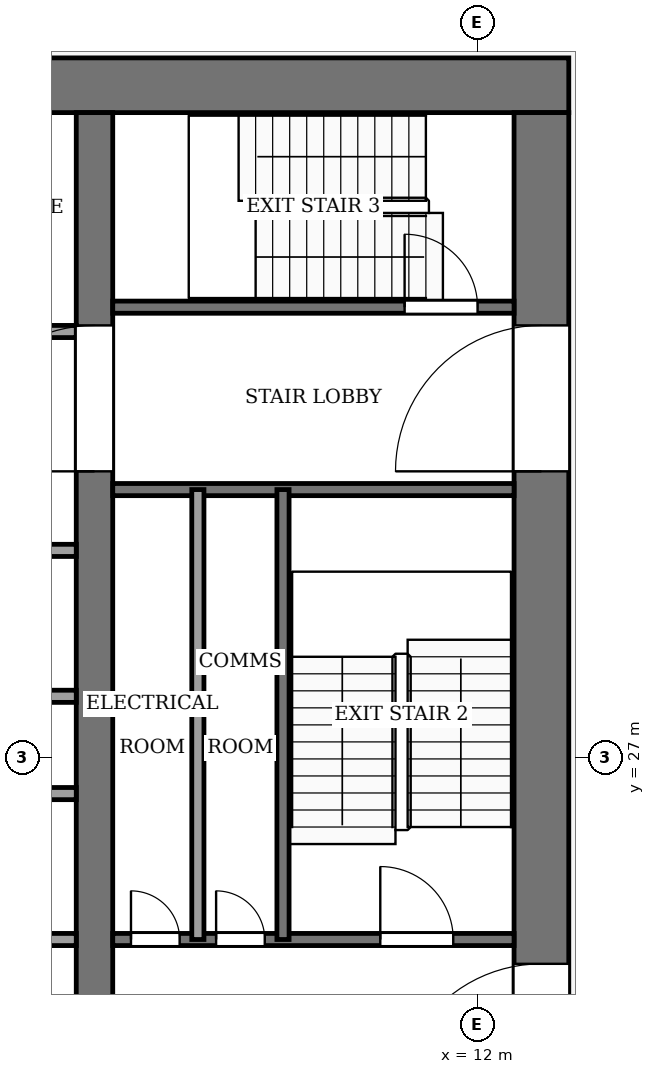
"""IFC4 building model, lengths in metres.
Left out: names, types, materials, properties, quantities, classifications, styles, units other than length and angle.
Written with IfcOpenShell. Run it as: python <this file> out.ifc"""

import sys

from ifc_helpers import new_model, si_unit, direction, frame, frame_2d, origin, place, context, subcontext, project, spatial, rectangle, extrude, element, fill, save


model = new_model("IFC4")
c1 = context("Model", 3, precision=1e-05, world=origin(), true_north=direction((0.0, 1.0)))
c2 = subcontext(c1, "Body", "Model", "MODEL_VIEW")
j1 = project(units=[si_unit("LENGTHUNIT", "METRE"), si_unit("PLANEANGLEUNIT", "RADIAN")], contexts=[c1])
p1 = place(None, origin())
s1 = spatial("IfcSite", under=j1, at=p1, CompositionType="ELEMENT")
p2 = place(p1, origin())
s2 = spatial("IfcBuilding", under=s1, at=p2, CompositionType="ELEMENT")
p3 = place(p2, frame((0.0, 0.0, 198.0)))
s3 = spatial("IfcBuildingStorey", under=s2, at=p3, CompositionType="ELEMENT", Elevation=198.0)
p4 = place(p3, frame((-13.5, 38.05, -0.13), z_axis=(0.0, 0.0, 1.0), x_axis=(1.0, 0.0, 0.0)))
e1 = element("IfcWall", 1, at=p4, inside=s3, PredefinedType="SHEAR", context=c2, shape_type="SweptSolid", body=[
    extrude(rectangle(XDim=27.0, YDim=0.9, at=frame_2d((13.5, 0.0))), origin(), (0.0, 0.0, 1.0), 4.0),
])
p5 = place(p3, frame((13.05, 18.4, -0.13), z_axis=(0.0, 0.0, 1.0), x_axis=(0.0, 1.0, 0.0)))
e2 = element("IfcWall", 2, at=p5, inside=s3, PredefinedType="SHEAR", context=c2, shape_type="SweptSolid", body=[
    extrude(rectangle(XDim=19.2, YDim=0.9, at=frame_2d((9.6, 0.0))), origin(), (0.0, 0.0, 1.0), 4.0),
])
p6 = place(p5, frame((2.8, 0.0, 0.13)))
e3 = element("IfcOpeningElement", 3, at=p6, cuts=e2, PredefinedType="OPENING", context=c2, shape_type="SweptSolid", body=[
    extrude(rectangle(XDim=2.4, YDim=2.4, at=frame_2d((1.2, 1.2))), frame((0.0, 0.46, 0.0), z_axis=(0.0, -1.0, 0.0), x_axis=(1.0, 0.0, 0.0)), (0.0, 0.0, 1.0), 0.92),
])
p7 = place(p5, frame((13.3, 0.0, 0.13)))
e4 = element("IfcOpeningElement", 4, at=p7, cuts=e2, PredefinedType="OPENING", context=c2, shape_type="SweptSolid", body=[
    extrude(rectangle(XDim=2.4, YDim=2.4, at=frame_2d((1.2, 1.2))), frame((0.0, 0.46, 0.0), z_axis=(0.0, -1.0, 0.0), x_axis=(1.0, 0.0, 0.0)), (0.0, 0.0, 1.0), 0.92),
])
p8 = place(p3, frame((5.7, 18.4, -0.13), z_axis=(0.0, 0.0, 1.0), x_axis=(0.0, 1.0, 0.0)))
e5 = element("IfcWall", 5, at=p8, inside=s3, PredefinedType="SHEAR", context=c2, shape_type="SweptSolid", body=[
    extrude(rectangle(XDim=19.2, YDim=0.6, at=frame_2d((9.6, 0.0))), origin(), (0.0, 0.0, 1.0), 4.0),
])
p9 = place(p8, frame((13.3, 0.0, 0.13)))
e6 = element("IfcOpeningElement", 6, at=p9, cuts=e5, PredefinedType="OPENING", context=c2, shape_type="SweptSolid", body=[
    extrude(rectangle(XDim=2.4, YDim=2.4, at=frame_2d((1.2, 1.2))), frame((0.0, 0.31, 0.0), z_axis=(0.0, -1.0, 0.0), x_axis=(1.0, 0.0, 0.0)), (0.0, 0.0, 1.0), 0.62),
])
p10 = place(p3, frame((-5.4, 24.0, 0.0), z_axis=(0.0, 0.0, 1.0), x_axis=(1.0, 0.0, 0.0)))
e7 = element("IfcWall", 7, at=p10, inside=s3, PredefinedType="PARTITIONING", context=c2, shape_type="SweptSolid", body=[
    extrude(rectangle(XDim=10.8, YDim=0.2, at=frame_2d((5.4, 0.0))), origin(), (0.0, 0.0, 1.0), 3.87),
])
p11 = place(p10, frame((0.75, 0.0, 0.0)))
e8 = element("IfcOpeningElement", 8, at=p11, cuts=e7, PredefinedType="OPENING", context=c2, shape_type="SweptSolid", body=[
    extrude(rectangle(XDim=1.2, YDim=2.2, at=frame_2d((0.6, 1.1))), frame((0.0, 0.11, 0.0), z_axis=(0.0, -1.0, 0.0), x_axis=(1.0, 0.0, 0.0)), (0.0, 0.0, 1.0), 0.22),
])
p12 = place(p10, frame((3.45, 0.0, 0.0)))
e9 = element("IfcOpeningElement", 9, at=p12, cuts=e7, PredefinedType="OPENING", context=c2, shape_type="SweptSolid", body=[
    extrude(rectangle(XDim=1.2, YDim=2.2, at=frame_2d((0.6, 1.1))), frame((0.0, 0.11, 0.0), z_axis=(0.0, -1.0, 0.0), x_axis=(1.0, 0.0, 0.0)), (0.0, 0.0, 1.0), 0.22),
])
p13 = place(p10, frame((6.15, 0.0, 0.0)))
e10 = element("IfcOpeningElement", 10, at=p13, cuts=e7, PredefinedType="OPENING", context=c2, shape_type="SweptSolid", body=[
    extrude(rectangle(XDim=1.2, YDim=2.2, at=frame_2d((0.6, 1.1))), frame((0.0, 0.11, 0.0), z_axis=(0.0, -1.0, 0.0), x_axis=(1.0, 0.0, 0.0)), (0.0, 0.0, 1.0), 0.22),
])
p14 = place(p10, frame((8.85, 0.0, 0.0)))
e11 = element("IfcOpeningElement", 11, at=p14, cuts=e7, PredefinedType="OPENING", context=c2, shape_type="SweptSolid", body=[
    extrude(rectangle(XDim=1.2, YDim=2.2, at=frame_2d((0.6, 1.1))), frame((0.0, 0.11, 0.0), z_axis=(0.0, -1.0, 0.0), x_axis=(1.0, 0.0, 0.0)), (0.0, 0.0, 1.0), 0.22),
])
p15 = place(p3, frame((6.0, 24.0, 0.0), z_axis=(0.0, 0.0, 1.0), x_axis=(1.0, 0.0, 0.0)))
e12 = element("IfcWall", 12, at=p15, inside=s3, PredefinedType="PARTITIONING", context=c2, shape_type="SweptSolid", body=[
    extrude(rectangle(XDim=6.6, YDim=0.2, at=frame_2d((3.3, 0.0))), origin(), (0.0, 0.0, 1.0), 3.87),
])
p16 = place(p15, frame((0.3, 0.0, 0.0)))
e13 = element("IfcOpeningElement", 13, at=p16, cuts=e12, PredefinedType="OPENING", context=c2, shape_type="SweptSolid", body=[
    extrude(rectangle(XDim=0.8, YDim=2.1, at=frame_2d((0.4, 1.05))), frame((0.0, 0.11, 0.0), z_axis=(0.0, -1.0, 0.0), x_axis=(1.0, 0.0, 0.0)), (0.0, 0.0, 1.0), 0.22),
])
p17 = place(p15, frame((1.7, 0.0, 0.0)))
e14 = element("IfcOpeningElement", 14, at=p17, cuts=e12, PredefinedType="OPENING", context=c2, shape_type="SweptSolid", body=[
    extrude(rectangle(XDim=0.8, YDim=2.1, at=frame_2d((0.4, 1.05))), frame((0.0, 0.11, 0.0), z_axis=(0.0, -1.0, 0.0), x_axis=(1.0, 0.0, 0.0)), (0.0, 0.0, 1.0), 0.22),
])
p18 = place(p15, frame((4.4, 0.0, 0.0)))
e15 = element("IfcOpeningElement", 15, at=p18, cuts=e12, PredefinedType="OPENING", context=c2, shape_type="SweptSolid", body=[
    extrude(rectangle(XDim=1.2, YDim=2.2, at=frame_2d((0.6, 1.1))), frame((0.0, 0.11, 0.0), z_axis=(0.0, -1.0, 0.0), x_axis=(1.0, 0.0, 0.0)), (0.0, 0.0, 1.0), 0.22),
])
for number, where, z_axis, x_axis in (
    (16, (-5.4, 26.4, 0.0), (0.0, 0.0, 1.0), (1.0, 0.0, 0.0)),
    (17, (-5.4, 28.0, 0.0), (0.0, 0.0, 1.0), (1.0, 0.0, 0.0)),
):
    element("IfcWall", number, at=place(p3, frame(where, z_axis=z_axis, x_axis=x_axis)), inside=s3, PredefinedType="PARTITIONING", context=c2, shape_type="SweptSolid", body=[
        extrude(rectangle(XDim=10.8, YDim=0.2, at=frame_2d((5.4, 0.0))), origin(), (0.0, 0.0, 1.0), 3.87),
    ])
p19 = place(p3, frame((-5.4, 30.4, 0.0), z_axis=(0.0, 0.0, 1.0), x_axis=(1.0, 0.0, 0.0)))
e18 = element("IfcWall", 18, at=p19, inside=s3, PredefinedType="PARTITIONING", context=c2, shape_type="SweptSolid", body=[
    extrude(rectangle(XDim=10.8, YDim=0.2, at=frame_2d((5.4, 0.0))), origin(), (0.0, 0.0, 1.0), 3.87),
])
p20 = place(p19, frame((2.632, 0.0, 0.0)))
e19 = element("IfcOpeningElement", 19, at=p20, cuts=e18, PredefinedType="OPENING", context=c2, shape_type="SweptSolid", body=[
    extrude(rectangle(XDim=1.0, YDim=2.1, at=frame_2d((0.5, 1.05))), frame((0.0, 0.11, 0.0), z_axis=(0.0, -1.0, 0.0), x_axis=(1.0, 0.0, 0.0)), (0.0, 0.0, 1.0), 0.22),
])
p21 = place(p19, frame((8.032, 0.0, 0.0)))
e20 = element("IfcOpeningElement", 20, at=p21, cuts=e18, PredefinedType="OPENING", context=c2, shape_type="SweptSolid", body=[
    extrude(rectangle(XDim=1.0, YDim=2.1, at=frame_2d((0.5, 1.05))), frame((0.0, 0.11, 0.0), z_axis=(0.0, -1.0, 0.0), x_axis=(1.0, 0.0, 0.0)), (0.0, 0.0, 1.0), 0.22),
])
p22 = place(p3, frame((6.0, 31.4, 0.0), z_axis=(0.0, 0.0, 1.0), x_axis=(1.0, 0.0, 0.0)))
e21 = element("IfcWall", 21, at=p22, inside=s3, PredefinedType="PARTITIONING", context=c2, shape_type="SweptSolid", body=[
    extrude(rectangle(XDim=6.6, YDim=0.2, at=frame_2d((3.3, 0.0))), origin(), (0.0, 0.0, 1.0), 3.87),
])
p23 = place(p3, frame((-5.4, 34.0, 0.0), z_axis=(0.0, 0.0, 1.0), x_axis=(1.0, 0.0, 0.0)))
e22 = element("IfcWall", 22, at=p23, inside=s3, PredefinedType="PARTITIONING", context=c2, shape_type="SweptSolid", body=[
    extrude(rectangle(XDim=10.8, YDim=0.2, at=frame_2d((5.4, 0.0))), origin(), (0.0, 0.0, 1.0), 3.87),
])
p24 = place(p23, frame((6.15, 0.0, 0.0)))
e23 = element("IfcOpeningElement", 23, at=p24, cuts=e22, PredefinedType="OPENING", context=c2, shape_type="SweptSolid", body=[
    extrude(rectangle(XDim=1.2, YDim=2.2, at=frame_2d((0.6, 1.1))), frame((0.0, 0.11, 0.0), z_axis=(0.0, -1.0, 0.0), x_axis=(1.0, 0.0, 0.0)), (0.0, 0.0, 1.0), 0.22),
])
p25 = place(p23, frame((8.95, 0.0, 0.0)))
e24 = element("IfcOpeningElement", 24, at=p25, cuts=e22, PredefinedType="OPENING", context=c2, shape_type="SweptSolid", body=[
    extrude(rectangle(XDim=1.0, YDim=2.1, at=frame_2d((0.5, 1.05))), frame((0.0, 0.11, 0.0), z_axis=(0.0, -1.0, 0.0), x_axis=(1.0, 0.0, 0.0)), (0.0, 0.0, 1.0), 0.22),
])
p26 = place(p3, frame((6.0, 34.4, 0.0), z_axis=(0.0, 0.0, 1.0), x_axis=(1.0, 0.0, 0.0)))
e25 = element("IfcWall", 25, at=p26, inside=s3, PredefinedType="PARTITIONING", context=c2, shape_type="SweptSolid", body=[
    extrude(rectangle(XDim=6.6, YDim=0.2, at=frame_2d((3.3, 0.0))), origin(), (0.0, 0.0, 1.0), 3.87),
])
p27 = place(p26, frame((4.8, 0.0, 0.0)))
e26 = element("IfcOpeningElement", 26, at=p27, cuts=e25, PredefinedType="OPENING", context=c2, shape_type="SweptSolid", body=[
    extrude(rectangle(XDim=1.2, YDim=2.2, at=frame_2d((0.6, 1.1))), frame((0.0, 0.11, 0.0), z_axis=(0.0, -1.0, 0.0), x_axis=(1.0, 0.0, 0.0)), (0.0, 0.0, 1.0), 0.22),
])
for number, where, z_axis, x_axis in (
    (27, (7.4, 24.0, 0.0), (0.0, 0.0, 1.0), (0.0, 1.0, 0.0)),
    (28, (8.8, 24.0, 0.0), (0.0, 0.0, 1.0), (0.0, 1.0, 0.0)),
):
    element("IfcWall", number, at=place(p3, frame(where, z_axis=z_axis, x_axis=x_axis)), inside=s3, PredefinedType="PARTITIONING", context=c2, shape_type="SweptSolid", body=[
        extrude(rectangle(XDim=7.4, YDim=0.2, at=frame_2d((3.7, 0.0))), origin(), (0.0, 0.0, 1.0), 3.87),
    ])
p28 = place(p16, origin())
e29 = element("IfcDoor", 29, at=p28, inside=s3, OperationType="SINGLE_SWING_LEFT", PredefinedType="DOOR", context=c2, shape_type="SweptSolid", body=[
    extrude(rectangle(XDim=0.8, YDim=2.1, at=frame_2d((0.4, 1.05))), frame((0.0, 0.025, 0.0), z_axis=(0.0, -1.0, 0.0), x_axis=(1.0, 0.0, 0.0)), (0.0, 0.0, 1.0), 0.05),
])
fill(e13, e29)
p29 = place(p17, origin())
e30 = element("IfcDoor", 30, at=p29, inside=s3, OperationType="SINGLE_SWING_RIGHT", PredefinedType="DOOR", context=c2, shape_type="SweptSolid", body=[
    extrude(rectangle(XDim=0.8, YDim=2.1, at=frame_2d((0.4, 1.05))), frame((0.0, 0.025, 0.0), z_axis=(0.0, -1.0, 0.0), x_axis=(1.0, 0.0, 0.0)), (0.0, 0.0, 1.0), 0.05),
])
fill(e14, e30)
p30 = place(p18, origin())
e31 = element("IfcDoor", 31, at=p30, inside=s3, OperationType="SINGLE_SWING_LEFT", PredefinedType="DOOR", context=c2, shape_type="SweptSolid", body=[
    extrude(rectangle(XDim=1.2, YDim=2.2, at=frame_2d((0.6, 1.1))), frame((0.0, 0.025, 0.0), z_axis=(0.0, -1.0, 0.0), x_axis=(1.0, 0.0, 0.0)), (0.0, 0.0, 1.0), 0.05),
])
fill(e15, e31)
p31 = place(p27, origin())
e32 = element("IfcDoor", 32, at=p31, inside=s3, OperationType="SINGLE_SWING_RIGHT", PredefinedType="DOOR", context=c2, shape_type="SweptSolid", body=[
    extrude(rectangle(XDim=1.2, YDim=2.2, at=frame_2d((0.6, 1.1))), frame((0.0, 0.025, 0.0), z_axis=(0.0, -1.0, 0.0), x_axis=(1.0, 0.0, 0.0)), (0.0, 0.0, 1.0), 0.05),
])
fill(e26, e32)
p32 = place(p9, origin())
e33 = element("IfcDoor", 33, at=p32, inside=s3, OperationType="DOUBLE_DOOR_SINGLE_SWING", PredefinedType="DOOR", context=c2, shape_type="SweptSolid", body=[
    extrude(rectangle(XDim=2.4, YDim=2.4, at=frame_2d((1.2, 1.2))), frame((0.0, 0.025, 0.0), z_axis=(0.0, -1.0, 0.0), x_axis=(1.0, 0.0, 0.0)), (0.0, 0.0, 1.0), 0.05),
])
fill(e6, e33)
p33 = place(p6, origin())
e34 = element("IfcDoor", 34, at=p33, inside=s3, OperationType="DOUBLE_DOOR_SINGLE_SWING", PredefinedType="DOOR", context=c2, shape_type="SweptSolid", body=[
    extrude(rectangle(XDim=2.4, YDim=2.4, at=frame_2d((1.2, 1.2))), frame((0.0, 0.025, 0.0), z_axis=(0.0, -1.0, 0.0), x_axis=(1.0, 0.0, 0.0)), (0.0, 0.0, 1.0), 0.05),
])
fill(e3, e34)
p34 = place(p7, origin())
e35 = element("IfcDoor", 35, at=p34, inside=s3, OperationType="DOUBLE_DOOR_SINGLE_SWING", PredefinedType="DOOR", context=c2, shape_type="SweptSolid", body=[
    extrude(rectangle(XDim=2.4, YDim=2.4, at=frame_2d((1.2, 1.2))), frame((0.0, 0.025, 0.0), z_axis=(0.0, -1.0, 0.0), x_axis=(1.0, 0.0, 0.0)), (0.0, 0.0, 1.0), 0.05),
])
fill(e4, e35)
save(model, sys.argv[1])
